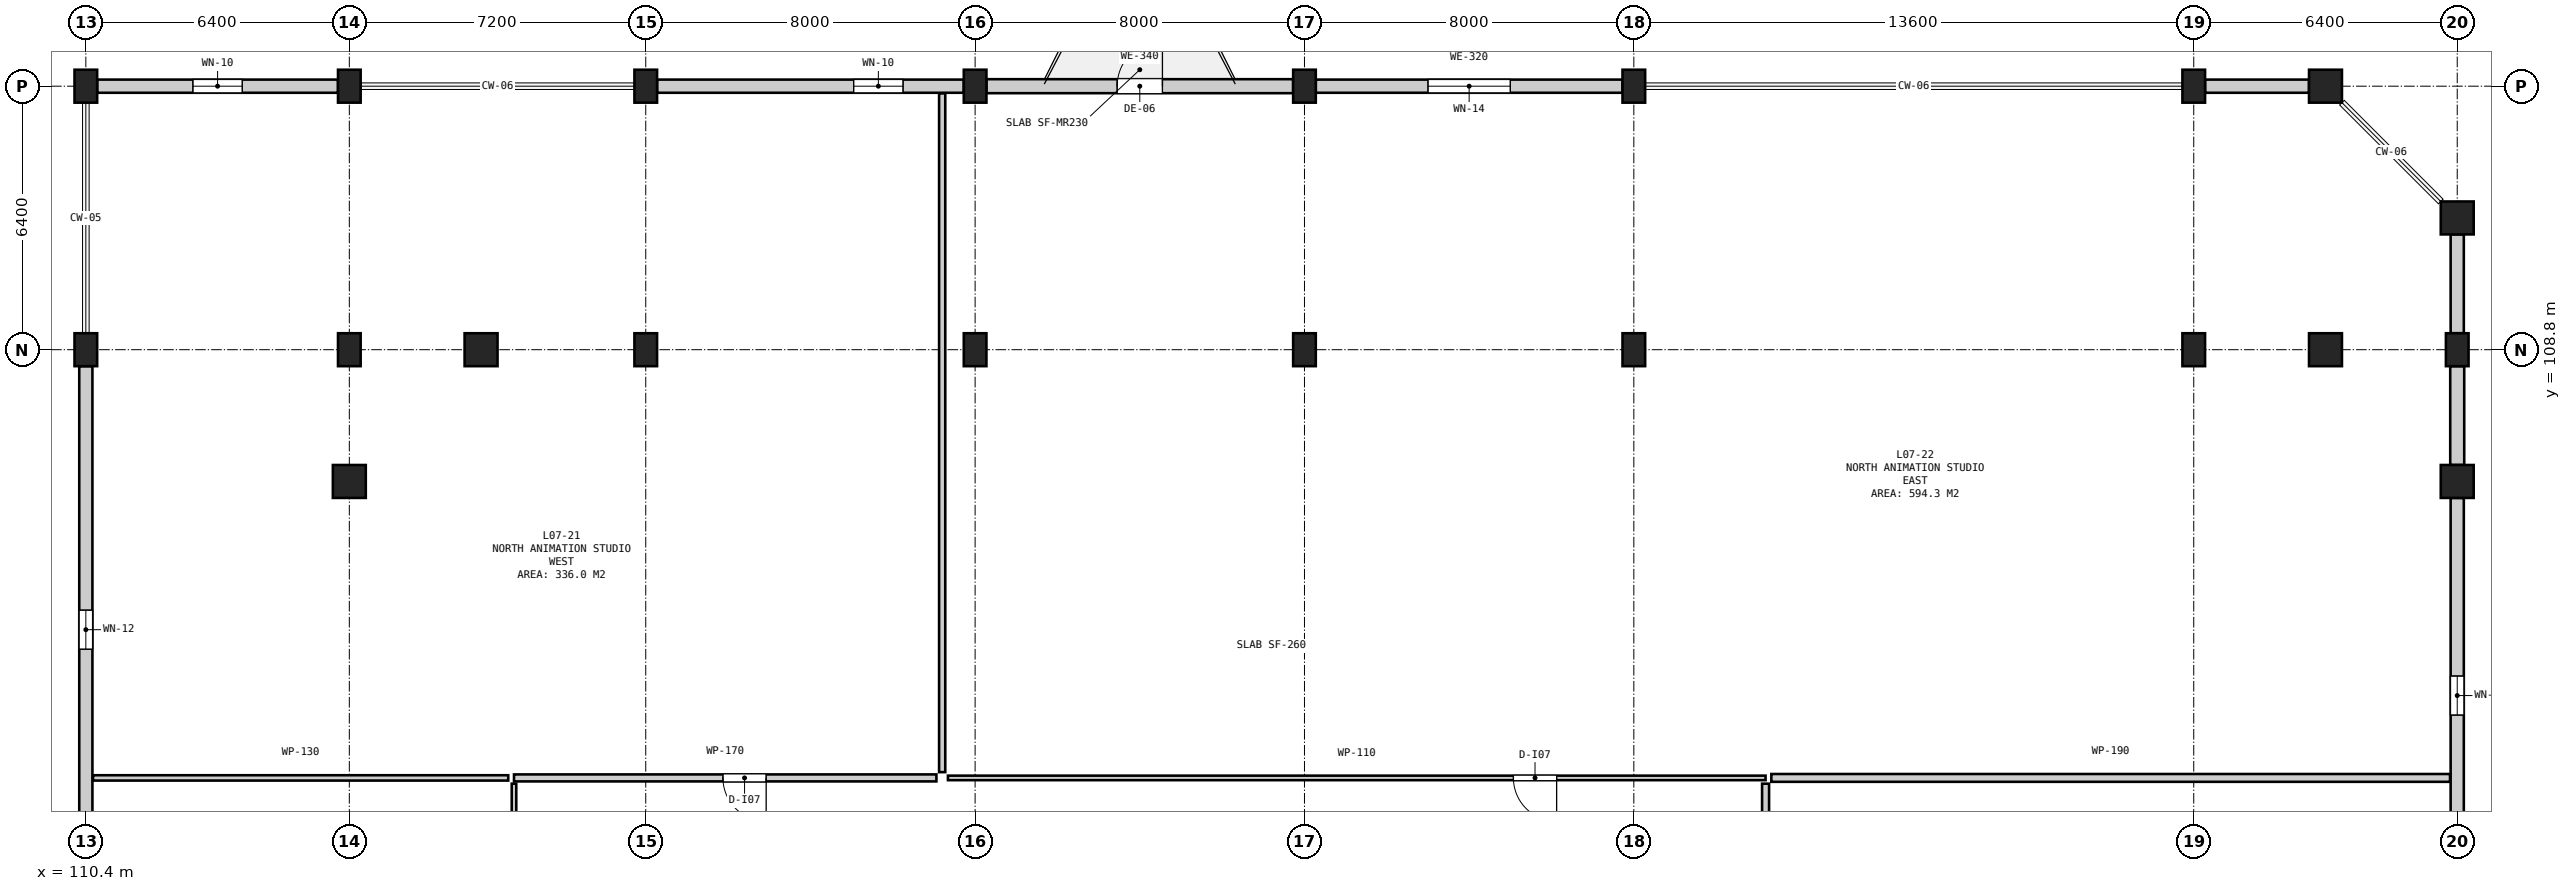
"""IFC4 building model, lengths in metres.
Left out: names, types, materials, properties, quantities, classifications, styles, units other than length and angle.
Written with IfcOpenShell. Run it as: python <this file> out.ifc"""

import sys

from ifc_helpers import new_model, si_unit, direction, frame, frame_2d, origin, origin_2d, place, context, subcontext, project, spatial, rectangle, circle, extrude, element, fill, save


model = new_model("IFC4")
c1 = context("Model", 3, precision=1e-05, world=origin(), true_north=direction((0.0, 1.0)))
c2 = subcontext(c1, "Body", "Model", "MODEL_VIEW")
j1 = project(units=[si_unit("LENGTHUNIT", "METRE"), si_unit("PLANEANGLEUNIT", "RADIAN")], contexts=[c1])
p1 = place(None, origin())
s1 = spatial("IfcSite", under=j1, at=p1, CompositionType="ELEMENT")
p2 = place(p1, origin())
s2 = spatial("IfcBuilding", under=s1, at=p2, CompositionType="ELEMENT")
p3 = place(p2, frame((0.0, 0.0, 31.7)))
s3 = spatial("IfcBuildingStorey", under=s2, at=p3, CompositionType="ELEMENT", Elevation=31.7)
for number, where, z_axis, x_axis in (
    (1, (110.4, 108.8, 0.0), (0.0, 0.0, 1.0), (1.0, 0.0, 0.0)),
    (2, (110.4, 115.2, 0.0), (0.0, 0.0, 1.0), (1.0, 0.0, 0.0)),
):
    element("IfcColumn", number, at=place(p3, frame(where, z_axis=z_axis, x_axis=x_axis)), inside=s3, PredefinedType="COLUMN", context=c2, shape_type="SweptSolid", body=[
        extrude(rectangle(XDim=0.55, YDim=0.8, at=origin_2d()), origin(), (0.0, 0.0, 1.0), 3.9),
    ])
p4 = place(p3, frame((116.8, 105.6, 0.0), z_axis=(0.0, 0.0, 1.0), x_axis=(1.0, 0.0, 0.0)))
e3 = element("IfcColumn", 3, at=p4, inside=s3, PredefinedType="COLUMN", context=c2, shape_type="SweptSolid", body=[
    extrude(circle(Radius=0.4, at=origin_2d()), origin(), (0.0, 0.0, 1.0), 3.9),
])
for number, where, z_axis, x_axis in (
    (4, (116.8, 108.8, 0.0), (0.0, 0.0, 1.0), (1.0, 0.0, 0.0)),
    (5, (116.8, 115.2, 0.0), (0.0, 0.0, 1.0), (1.0, 0.0, 0.0)),
):
    element("IfcColumn", number, at=place(p3, frame(where, z_axis=z_axis, x_axis=x_axis)), inside=s3, PredefinedType="COLUMN", context=c2, shape_type="SweptSolid", body=[
        extrude(rectangle(XDim=0.55, YDim=0.8, at=origin_2d()), origin(), (0.0, 0.0, 1.0), 3.9),
    ])
p5 = place(p3, frame((120.0, 108.8, 0.0), z_axis=(0.0, 0.0, 1.0), x_axis=(1.0, 0.0, 0.0)))
e6 = element("IfcColumn", 6, at=p5, inside=s3, PredefinedType="COLUMN", context=c2, shape_type="SweptSolid", body=[
    extrude(circle(Radius=0.4, at=origin_2d()), origin(), (0.0, 0.0, 1.0), 3.9),
])
for number, where, z_axis, x_axis in (
    (7, (124.0, 108.8, 0.0), (0.0, 0.0, 1.0), (1.0, 0.0, 0.0)),
    (8, (124.0, 115.2, 0.0), (0.0, 0.0, 1.0), (1.0, 0.0, 0.0)),
    (9, (132.0, 108.8, 0.0), (0.0, 0.0, 1.0), (1.0, 0.0, 0.0)),
    (10, (132.0, 115.2, 0.0), (0.0, 0.0, 1.0), (1.0, 0.0, 0.0)),
    (11, (140.0, 108.8, 0.0), (0.0, 0.0, 1.0), (1.0, 0.0, 0.0)),
    (12, (140.0, 115.2, 0.0), (0.0, 0.0, 1.0), (1.0, 0.0, 0.0)),
    (13, (148.0, 108.8, 0.0), (0.0, 0.0, 1.0), (1.0, 0.0, 0.0)),
    (14, (148.0, 115.2, 0.0), (0.0, 0.0, 1.0), (1.0, 0.0, 0.0)),
    (15, (161.6, 108.8, 0.0), (0.0, 0.0, 1.0), (1.0, 0.0, 0.0)),
    (16, (161.6, 115.2, 0.0), (0.0, 0.0, 1.0), (1.0, 0.0, 0.0)),
):
    element("IfcColumn", number, at=place(p3, frame(where, z_axis=z_axis, x_axis=x_axis)), inside=s3, PredefinedType="COLUMN", context=c2, shape_type="SweptSolid", body=[
        extrude(rectangle(XDim=0.55, YDim=0.8, at=origin_2d()), origin(), (0.0, 0.0, 1.0), 3.9),
    ])
for number, where, z_axis, x_axis in (
    (17, (164.8, 108.8, 0.0), (0.0, 0.0, 1.0), (1.0, 0.0, 0.0)),
    (18, (164.8, 115.2, 0.0), (0.0, 0.0, 1.0), (1.0, 0.0, 0.0)),
    (19, (168.0, 105.6, 0.0), (0.0, 0.0, 1.0), (1.0, 0.0, 0.0)),
):
    element("IfcColumn", number, at=place(p3, frame(where, z_axis=z_axis, x_axis=x_axis)), inside=s3, PredefinedType="COLUMN", context=c2, shape_type="SweptSolid", body=[
        extrude(circle(Radius=0.4, at=origin_2d()), origin(), (0.0, 0.0, 1.0), 3.9),
    ])
p6 = place(p3, frame((168.0, 108.8, 0.0), z_axis=(0.0, 0.0, 1.0), x_axis=(1.0, 0.0, 0.0)))
e20 = element("IfcColumn", 20, at=p6, inside=s3, PredefinedType="COLUMN", context=c2, shape_type="SweptSolid", body=[
    extrude(rectangle(XDim=0.55, YDim=0.8, at=origin_2d()), origin(), (0.0, 0.0, 1.0), 3.9),
])
p7 = place(p3, frame((168.0, 112.0, 0.0), z_axis=(0.0, 0.0, 1.0), x_axis=(1.0, 0.0, 0.0)))
e21 = element("IfcColumn", 21, at=p7, inside=s3, PredefinedType="COLUMN", context=c2, shape_type="SweptSolid", body=[
    extrude(circle(Radius=0.4, at=origin_2d()), origin(), (0.0, 0.0, 1.0), 3.9),
])
p8 = place(p3, frame((168.0, 95.6, 0.0), z_axis=(0.0, 0.0, 1.0), x_axis=(0.0, 1.0, 0.0)))
e22 = element("IfcWall", 22, at=p8, inside=s3, PredefinedType="SOLIDWALL", context=c2, shape_type="SweptSolid", body=[
    extrude(rectangle(XDim=9.6, YDim=0.32, at=frame_2d((4.8, 0.0))), origin(), (0.0, 0.0, 1.0), 2.625),
])
p9 = place(p8, frame((4.325, 0.0, 0.8)))
e23 = element("IfcOpeningElement", 23, at=p9, cuts=e22, PredefinedType="OPENING", context=c2, shape_type="SweptSolid", body=[
    extrude(rectangle(XDim=0.95, YDim=1.45, at=frame_2d((0.475, 0.725))), frame((0.0, 0.172, 0.0), z_axis=(0.0, -1.0, 0.0), x_axis=(1.0, 0.0, 0.0)), (0.0, 0.0, 1.0), 0.344),
])
p10 = place(p3, frame((168.0, 106.0, 0.0), z_axis=(0.0, 0.0, 1.0), x_axis=(0.0, 1.0, 0.0)))
e24 = element("IfcWall", 24, at=p10, inside=s3, PredefinedType="SOLIDWALL", context=c2, shape_type="SweptSolid", body=[
    extrude(rectangle(XDim=2.4, YDim=0.34, at=frame_2d((1.2, 0.0))), origin(), (0.0, 0.0, 1.0), 2.625),
])
p11 = place(p3, frame((168.0, 109.2, 0.0), z_axis=(0.0, 0.0, 1.0), x_axis=(0.0, 1.0, 0.0)))
e25 = element("IfcWall", 25, at=p11, inside=s3, PredefinedType="SOLIDWALL", context=c2, shape_type="SweptSolid", body=[
    extrude(rectangle(XDim=2.4, YDim=0.32, at=frame_2d((1.2, 0.0))), origin(), (0.0, 0.0, 1.0), 3.04),
])
p12 = place(p3, frame((164.4, 115.2, 0.0), z_axis=(0.0, 0.0, 1.0), x_axis=(-1.0, 0.0, 0.0)))
e26 = element("IfcWall", 26, at=p12, inside=s3, PredefinedType="SOLIDWALL", context=c2, shape_type="SweptSolid", body=[
    extrude(rectangle(XDim=2.525, YDim=0.32, at=frame_2d((1.262, 0.0))), origin(), (0.0, 0.0, 1.0), 3.04),
])
p13 = place(p3, frame((147.725, 115.2, 0.0), z_axis=(0.0, 0.0, 1.0), x_axis=(-1.0, 0.0, 0.0)))
e27 = element("IfcWall", 27, at=p13, inside=s3, PredefinedType="SOLIDWALL", context=c2, shape_type="SweptSolid", body=[
    extrude(rectangle(XDim=7.45, YDim=0.32, at=frame_2d((3.725, 0.0))), origin(), (0.0, 0.0, 1.0), 3.04),
])
p14 = place(p13, frame((2.725, 0.0, 0.9)))
e28 = element("IfcOpeningElement", 28, at=p14, cuts=e27, PredefinedType="OPENING", context=c2, shape_type="SweptSolid", body=[
    extrude(rectangle(XDim=2.0, YDim=1.65, at=frame_2d((1.0, 0.825))), frame((0.0, 0.172, 0.0), z_axis=(0.0, -1.0, 0.0), x_axis=(1.0, 0.0, 0.0)), (0.0, 0.0, 1.0), 0.344),
])
p15 = place(p3, frame((139.725, 115.2, 0.0), z_axis=(0.0, 0.0, 1.0), x_axis=(-1.0, 0.0, 0.0)))
e29 = element("IfcWall", 29, at=p15, inside=s3, PredefinedType="SOLIDWALL", context=c2, shape_type="SweptSolid", body=[
    extrude(rectangle(XDim=7.45, YDim=0.34, at=frame_2d((3.725, 0.0))), origin(), (0.0, 0.0, 1.0), 3.04),
])
p16 = place(p15, frame((3.175, 0.0, 0.0)))
e30 = element("IfcOpeningElement", 30, at=p16, cuts=e29, PredefinedType="OPENING", context=c2, shape_type="SweptSolid", body=[
    extrude(rectangle(XDim=1.1, YDim=2.2, at=frame_2d((0.55, 1.1))), frame((0.0, 0.182, 0.0), z_axis=(0.0, -1.0, 0.0), x_axis=(1.0, 0.0, 0.0)), (0.0, 0.0, 1.0), 0.364),
])
p17 = place(p3, frame((131.725, 115.2, 0.0), z_axis=(0.0, 0.0, 1.0), x_axis=(-1.0, 0.0, 0.0)))
e31 = element("IfcWall", 31, at=p17, inside=s3, PredefinedType="SOLIDWALL", context=c2, shape_type="SweptSolid", body=[
    extrude(rectangle(XDim=7.45, YDim=0.32, at=frame_2d((3.725, 0.0))), origin(), (0.0, 0.0, 1.0), 3.04),
])
p18 = place(p17, frame((1.475, 0.0, 0.9)))
e32 = element("IfcOpeningElement", 32, at=p18, cuts=e31, PredefinedType="OPENING", context=c2, shape_type="SweptSolid", body=[
    extrude(rectangle(XDim=1.2, YDim=1.7, at=frame_2d((0.6, 0.85))), frame((0.0, 0.172, 0.0), z_axis=(0.0, -1.0, 0.0), x_axis=(1.0, 0.0, 0.0)), (0.0, 0.0, 1.0), 0.344),
])
p19 = place(p3, frame((116.525, 115.2, 0.0), z_axis=(0.0, 0.0, 1.0), x_axis=(-1.0, 0.0, 0.0)))
e33 = element("IfcWall", 33, at=p19, inside=s3, PredefinedType="SOLIDWALL", context=c2, shape_type="SweptSolid", body=[
    extrude(rectangle(XDim=5.85, YDim=0.32, at=frame_2d((2.925, 0.0))), origin(), (0.0, 0.0, 1.0), 3.025),
])
p20 = place(p19, frame((2.325, 0.0, 0.9)))
e34 = element("IfcOpeningElement", 34, at=p20, cuts=e33, PredefinedType="OPENING", context=c2, shape_type="SweptSolid", body=[
    extrude(rectangle(XDim=1.2, YDim=1.7, at=frame_2d((0.6, 0.85))), frame((0.0, 0.172, 0.0), z_axis=(0.0, -1.0, 0.0), x_axis=(1.0, 0.0, 0.0)), (0.0, 0.0, 1.0), 0.344),
])
p21 = place(p3, frame((110.4, 108.4, 0.0), z_axis=(0.0, 0.0, 1.0), x_axis=(0.0, -1.0, 0.0)))
e35 = element("IfcWall", 35, at=p21, inside=s3, PredefinedType="SOLIDWALL", context=c2, shape_type="SweptSolid", body=[
    extrude(rectangle(XDim=12.8, YDim=0.32, at=frame_2d((6.4, 0.0))), origin(), (0.0, 0.0, 1.0), 2.575),
])
p22 = place(p21, frame((5.925, 0.0, 0.8)))
e36 = element("IfcOpeningElement", 36, at=p22, cuts=e35, PredefinedType="OPENING", context=c2, shape_type="SweptSolid", body=[
    extrude(rectangle(XDim=0.95, YDim=1.45, at=frame_2d((0.475, 0.725))), frame((0.0, 0.172, 0.0), z_axis=(0.0, -1.0, 0.0), x_axis=(1.0, 0.0, 0.0)), (0.0, 0.0, 1.0), 0.344),
])
p23 = place(p3, frame((151.34, 98.4, 0.0), z_axis=(0.0, 0.0, 1.0), x_axis=(1.0, 0.0, 0.0)))
e37 = element("IfcWall", 37, at=p23, inside=s3, PredefinedType="PARTITIONING", context=c2, shape_type="SweptSolid", body=[
    extrude(rectangle(XDim=16.485, YDim=0.19, at=frame_2d((8.242, 0.0))), origin(), (0.0, 0.0, 1.0), 3.62),
])
p24 = place(p3, frame((151.2, 86.54, 0.0), z_axis=(0.0, 0.0, 1.0), x_axis=(0.0, 1.0, 0.0)))
e38 = element("IfcWall", 38, at=p24, inside=s3, PredefinedType="PARTITIONING", context=c2, shape_type="SweptSolid", body=[
    extrude(rectangle(XDim=11.72, YDim=0.17, at=frame_2d((5.86, 0.0))), origin(), (0.0, 0.0, 1.0), 3.62),
])
p25 = place(p24, frame((4.435, 0.0, 0.0)))
e39 = element("IfcOpeningElement", 39, at=p25, cuts=e38, PredefinedType="OPENING", context=c2, shape_type="SweptSolid", body=[
    extrude(rectangle(XDim=1.05, YDim=2.15, at=frame_2d((0.525, 1.075))), frame((0.0, 0.097, 0.0), z_axis=(0.0, -1.0, 0.0), x_axis=(1.0, 0.0, 0.0)), (0.0, 0.0, 1.0), 0.194),
])
p26 = place(p3, frame((110.575, 98.4, 0.0), z_axis=(0.0, 0.0, 1.0), x_axis=(1.0, 0.0, 0.0)))
e40 = element("IfcWall", 40, at=p26, inside=s3, PredefinedType="PARTITIONING", context=c2, shape_type="SweptSolid", body=[
    extrude(rectangle(XDim=10.085, YDim=0.13, at=frame_2d((5.042, 0.0))), origin(), (0.0, 0.0, 1.0), 3.62),
])
p27 = place(p3, frame((120.8, 76.14, 0.0), z_axis=(0.0, 0.0, 1.0), x_axis=(0.0, 1.0, 0.0)))
e41 = element("IfcWall", 41, at=p27, inside=s3, PredefinedType="PARTITIONING", context=c2, shape_type="SweptSolid", body=[
    extrude(rectangle(XDim=22.12, YDim=0.11, at=frame_2d((11.06, 0.0))), origin(), (0.0, 0.0, 1.0), 3.62),
])
p28 = place(p27, frame((10.535, 0.0, 0.0)))
e42 = element("IfcOpeningElement", 42, at=p28, cuts=e41, PredefinedType="OPENING", context=c2, shape_type="SweptSolid", body=[
    extrude(rectangle(XDim=1.05, YDim=2.15, at=frame_2d((0.525, 1.075))), frame((0.0, 0.067, 0.0), z_axis=(0.0, -1.0, 0.0), x_axis=(1.0, 0.0, 0.0)), (0.0, 0.0, 1.0), 0.134),
])
p29 = place(p3, frame((120.8, 98.4, 0.0), z_axis=(0.0, 0.0, 1.0), x_axis=(1.0, 0.0, 0.0)))
e43 = element("IfcWall", 43, at=p29, inside=s3, PredefinedType="PARTITIONING", context=c2, shape_type="SweptSolid", body=[
    extrude(rectangle(XDim=10.26, YDim=0.17, at=frame_2d((5.13, 0.0))), origin(), (0.0, 0.0, 1.0), 3.62),
])
p30 = place(p29, frame((5.075, 0.0, 0.0)))
e44 = element("IfcOpeningElement", 44, at=p30, cuts=e43, PredefinedType="OPENING", context=c2, shape_type="SweptSolid", body=[
    extrude(rectangle(XDim=1.05, YDim=2.15, at=frame_2d((0.525, 1.075))), frame((0.0, 0.097, 0.0), z_axis=(0.0, -1.0, 0.0), x_axis=(1.0, 0.0, 0.0)), (0.0, 0.0, 1.0), 0.194),
])
p31 = place(p3, frame((131.2, 98.54, 0.0), z_axis=(0.0, 0.0, 1.0), x_axis=(0.0, 1.0, 0.0)))
e45 = element("IfcWall", 45, at=p31, inside=s3, PredefinedType="PARTITIONING", context=c2, shape_type="SweptSolid", body=[
    extrude(rectangle(XDim=16.485, YDim=0.15, at=frame_2d((8.242, 0.0))), origin(), (0.0, 0.0, 1.0), 3.62),
])
p32 = place(p3, frame((131.34, 98.4, 0.0), z_axis=(0.0, 0.0, 1.0), x_axis=(1.0, 0.0, 0.0)))
e46 = element("IfcWall", 46, at=p32, inside=s3, PredefinedType="PARTITIONING", context=c2, shape_type="SweptSolid", body=[
    extrude(rectangle(XDim=19.86, YDim=0.11, at=frame_2d((9.93, 0.0))), origin(), (0.0, 0.0, 1.0), 3.62),
])
p33 = place(p32, frame((13.735, 0.0, 0.0)))
e47 = element("IfcOpeningElement", 47, at=p33, cuts=e46, PredefinedType="OPENING", context=c2, shape_type="SweptSolid", body=[
    extrude(rectangle(XDim=1.05, YDim=2.15, at=frame_2d((0.525, 1.075))), frame((0.0, 0.067, 0.0), z_axis=(0.0, -1.0, 0.0), x_axis=(1.0, 0.0, 0.0)), (0.0, 0.0, 1.0), 0.134),
])
p34 = place(p9, origin())
e48 = element("IfcWindow", 48, at=p34, inside=s3, PartitioningType="SINGLE_PANEL", PredefinedType="WINDOW", context=c2, shape_type="SweptSolid", body=[
    extrude(rectangle(XDim=0.95, YDim=1.45, at=frame_2d((0.475, 0.725))), frame((0.0, 0.03, 0.0), z_axis=(0.0, -1.0, 0.0), x_axis=(1.0, 0.0, 0.0)), (0.0, 0.0, 1.0), 0.06),
])
fill(e23, e48)
p35 = place(p14, origin())
e49 = element("IfcWindow", 49, at=p35, inside=s3, PartitioningType="DOUBLE_PANEL_HORIZONTAL", PredefinedType="WINDOW", context=c2, shape_type="SweptSolid", body=[
    extrude(rectangle(XDim=2.0, YDim=1.65, at=frame_2d((1.0, 0.825))), frame((0.0, 0.03, 0.0), z_axis=(0.0, -1.0, 0.0), x_axis=(1.0, 0.0, 0.0)), (0.0, 0.0, 1.0), 0.06),
])
fill(e28, e49)
p36 = place(p16, frame((1.1, 0.0, 0.0), z_axis=(0.0, 0.0, 1.0), x_axis=(-1.0, 0.0, 0.0)))
e50 = element("IfcDoor", 50, at=p36, inside=s3, OperationType="SINGLE_SWING_RIGHT", PredefinedType="DOOR", context=c2, shape_type="SweptSolid", body=[
    extrude(rectangle(XDim=1.1, YDim=2.2, at=frame_2d((0.55, 1.1))), frame((0.0, 0.025, 0.0), z_axis=(0.0, -1.0, 0.0), x_axis=(1.0, 0.0, 0.0)), (0.0, 0.0, 1.0), 0.05),
])
fill(e30, e50)
p37 = place(p18, origin())
e51 = element("IfcWindow", 51, at=p37, inside=s3, PartitioningType="SINGLE_PANEL", PredefinedType="WINDOW", context=c2, shape_type="SweptSolid", body=[
    extrude(rectangle(XDim=1.2, YDim=1.7, at=frame_2d((0.6, 0.85))), frame((0.0, 0.03, 0.0), z_axis=(0.0, -1.0, 0.0), x_axis=(1.0, 0.0, 0.0)), (0.0, 0.0, 1.0), 0.06),
])
fill(e32, e51)
p38 = place(p20, origin())
e52 = element("IfcWindow", 52, at=p38, inside=s3, PartitioningType="SINGLE_PANEL", PredefinedType="WINDOW", context=c2, shape_type="SweptSolid", body=[
    extrude(rectangle(XDim=1.2, YDim=1.7, at=frame_2d((0.6, 0.85))), frame((0.0, 0.03, 0.0), z_axis=(0.0, -1.0, 0.0), x_axis=(1.0, 0.0, 0.0)), (0.0, 0.0, 1.0), 0.06),
])
fill(e34, e52)
p39 = place(p22, origin())
e53 = element("IfcWindow", 53, at=p39, inside=s3, PartitioningType="SINGLE_PANEL", PredefinedType="WINDOW", context=c2, shape_type="SweptSolid", body=[
    extrude(rectangle(XDim=0.95, YDim=1.45, at=frame_2d((0.475, 0.725))), frame((0.0, 0.03, 0.0), z_axis=(0.0, -1.0, 0.0), x_axis=(1.0, 0.0, 0.0)), (0.0, 0.0, 1.0), 0.06),
])
fill(e36, e53)
p40 = place(p30, frame((1.05, 0.0, 0.0), z_axis=(0.0, 0.0, 1.0), x_axis=(-1.0, 0.0, 0.0)))
e54 = element("IfcDoor", 54, at=p40, inside=s3, OperationType="SINGLE_SWING_LEFT", PredefinedType="DOOR", context=c2, shape_type="SweptSolid", body=[
    extrude(rectangle(XDim=1.05, YDim=2.15, at=frame_2d((0.525, 1.075))), frame((0.0, 0.025, 0.0), z_axis=(0.0, -1.0, 0.0), x_axis=(1.0, 0.0, 0.0)), (0.0, 0.0, 1.0), 0.05),
])
fill(e44, e54)
p41 = place(p33, frame((1.05, 0.0, 0.0), z_axis=(0.0, 0.0, 1.0), x_axis=(-1.0, 0.0, 0.0)))
e55 = element("IfcDoor", 55, at=p41, inside=s3, OperationType="SINGLE_SWING_LEFT", PredefinedType="DOOR", context=c2, shape_type="SweptSolid", body=[
    extrude(rectangle(XDim=1.05, YDim=2.15, at=frame_2d((0.525, 1.075))), frame((0.0, 0.025, 0.0), z_axis=(0.0, -1.0, 0.0), x_axis=(1.0, 0.0, 0.0)), (0.0, 0.0, 1.0), 0.05),
])
fill(e47, e55)
save(model, sys.argv[1])
